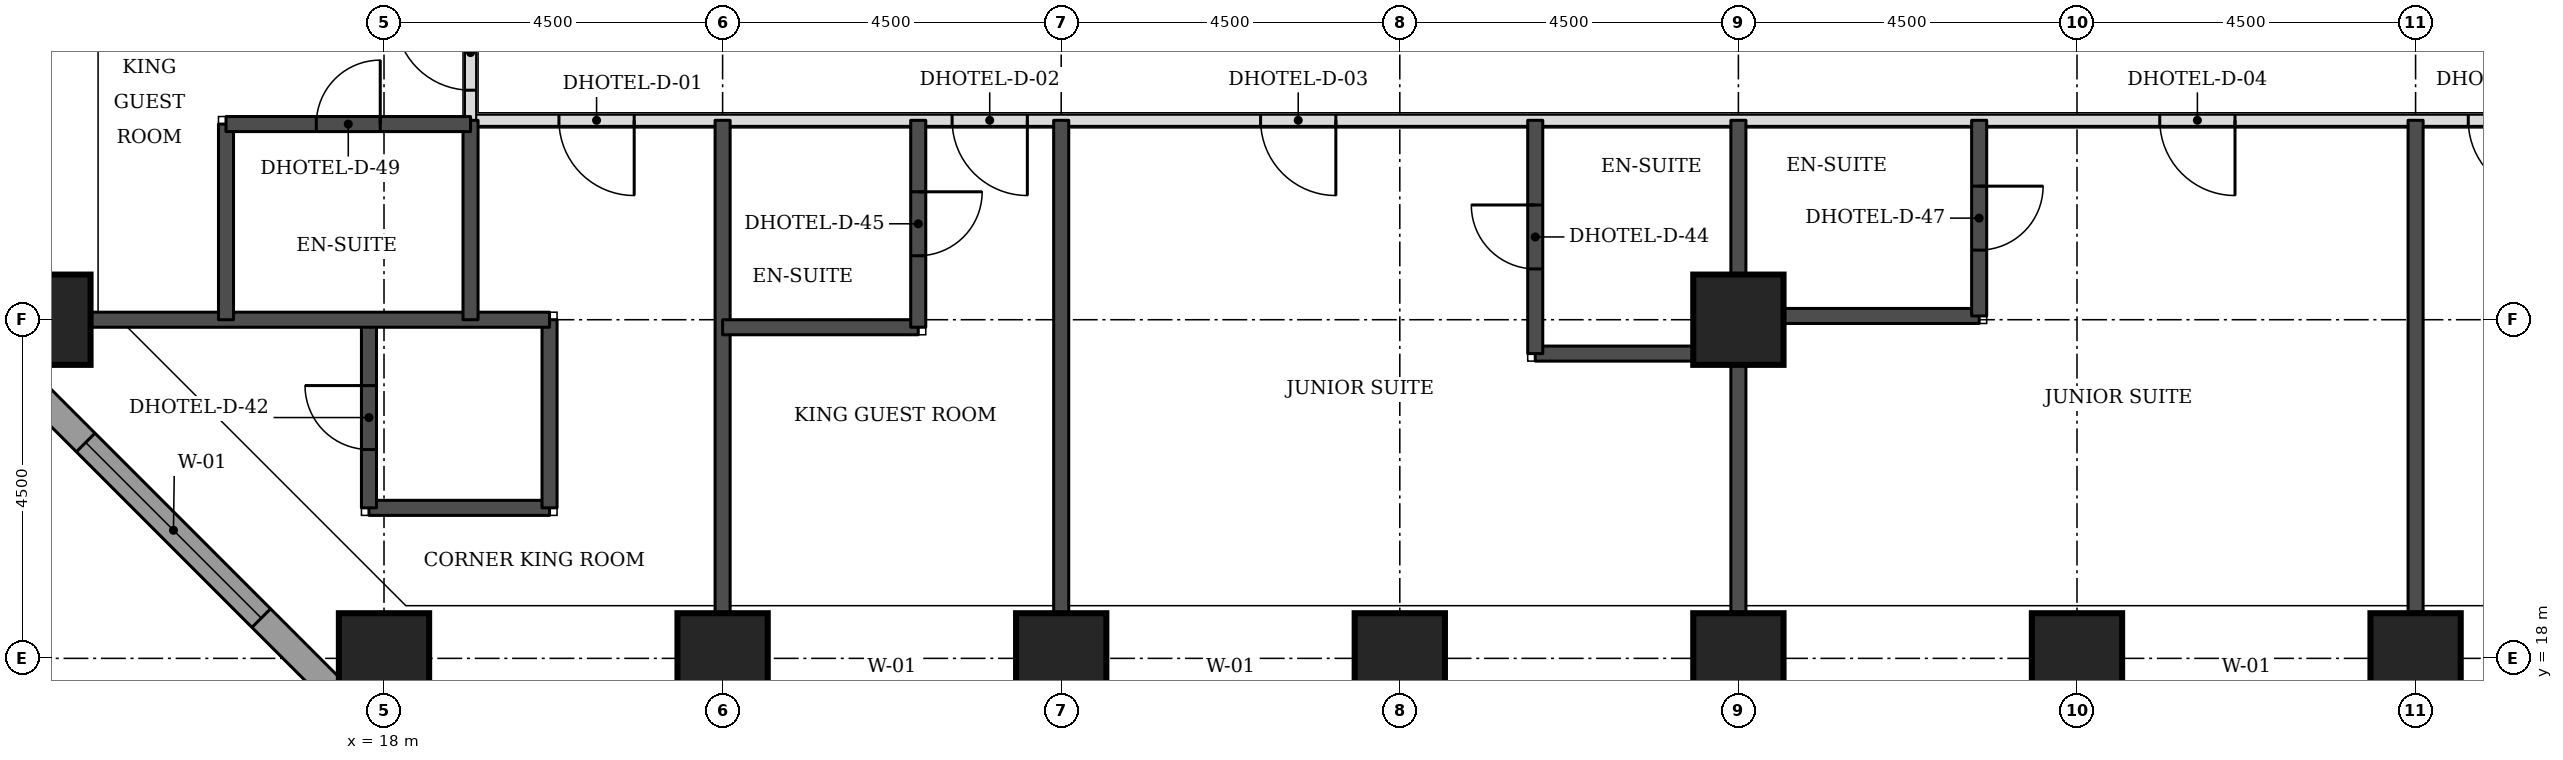
"""IFC4 building model, lengths in metres.
Left out: names, types, materials, properties, quantities, classifications, styles, units other than length and angle.
Written with IfcOpenShell. Run it as: python <this file> out.ifc"""

import sys

from ifc_helpers import new_model, si_unit, direction, frame, frame_2d, origin, origin_2d, place, context, subcontext, project, spatial, rectangle, extrude, element, fill, save


model = new_model("IFC4")
c1 = context("Model", 3, precision=1e-05, world=origin(), true_north=direction((0.0, 1.0)))
c2 = subcontext(c1, "Body", "Model", "MODEL_VIEW")
j1 = project(units=[si_unit("LENGTHUNIT", "METRE"), si_unit("PLANEANGLEUNIT", "RADIAN")], contexts=[c1])
p1 = place(None, origin())
s1 = spatial("IfcSite", under=j1, at=p1, CompositionType="ELEMENT")
p2 = place(p1, origin())
s2 = spatial("IfcBuilding", under=s1, at=p2, CompositionType="ELEMENT")
p3 = place(p2, frame((0.0, 0.0, 59.4)))
s3 = spatial("IfcBuildingStorey", under=s2, at=p3, CompositionType="ELEMENT", Elevation=59.4)
for number, where, z_axis, x_axis in (
    (1, (18.0, 18.0, 0.0), (0.0, 0.0, 1.0), (1.0, 0.0, 0.0)),
    (2, (22.5, 18.0, 0.0), (0.0, 0.0, 1.0), (1.0, 0.0, 0.0)),
    (3, (27.0, 18.0, 0.0), (0.0, 0.0, 1.0), (1.0, 0.0, 0.0)),
    (4, (31.5, 18.0, 0.0), (0.0, 0.0, 1.0), (1.0, 0.0, 0.0)),
    (5, (36.0, 18.0, 0.0), (0.0, 0.0, 1.0), (1.0, 0.0, 0.0)),
    (6, (40.5, 18.0, 0.0), (0.0, 0.0, 1.0), (1.0, 0.0, 0.0)),
    (7, (45.0, 18.0, 0.0), (0.0, 0.0, 1.0), (1.0, 0.0, 0.0)),
    (8, (13.5, 22.5, 0.0), (0.0, 0.0, 1.0), (1.0, 0.0, 0.0)),
    (9, (36.0, 22.5, 0.0), (0.0, 0.0, 1.0), (1.0, 0.0, 0.0)),
):
    element("IfcColumn", number, at=place(p3, frame(where, z_axis=z_axis, x_axis=x_axis)), inside=s3, PredefinedType="COLUMN", context=c2, shape_type="SweptSolid", body=[
        extrude(rectangle(XDim=1.2, YDim=1.2, at=origin_2d()), origin(), (0.0, 0.0, 1.0), 3.3),
    ])
p4 = place(p3, frame((12.674, 22.23, 0.0), z_axis=(0.0, 0.0, 1.0), x_axis=(0.707106781187, -0.707106781187, 0.0)))
e10 = element("IfcWall", 10, at=p4, inside=s3, PredefinedType="STANDARD", context=c2, shape_type="SweptSolid", body=[
    extrude(rectangle(XDim=7.151, YDim=0.35, at=frame_2d((3.576, 0.0))), origin(), (0.0, 0.0, 1.0), 3.055),
])
p5 = place(p4, frame((1.926, 0.0, 0.8)))
e11 = element("IfcOpeningElement", 11, at=p5, cuts=e10, PredefinedType="OPENING", context=c2, shape_type="SweptSolid", body=[
    extrude(rectangle(XDim=3.3, YDim=1.5, at=frame_2d((1.65, 0.75))), frame((0.0, 0.185, 0.0), z_axis=(0.0, -1.0, 0.0), x_axis=(1.0, 0.0, 0.0)), (0.0, 0.0, 1.0), 0.37),
])
p6 = place(p3, frame((19.15, 25.15, 0.0), z_axis=(0.0, 0.0, 1.0), x_axis=(1.0, 0.0, 0.0)))
e12 = element("IfcWall", 12, at=p6, inside=s3, PredefinedType="PARTITIONING", context=c2, shape_type="SweptSolid", body=[
    extrude(rectangle(XDim=32.35, YDim=0.15, at=frame_2d((16.175, 0.0))), origin(), (0.0, 0.0, 1.0), 3.08),
])
p7 = place(p6, frame((6.4, 0.0, 0.0)))
e13 = element("IfcOpeningElement", 13, at=p7, cuts=e12, PredefinedType="OPENING", context=c2, shape_type="SweptSolid", body=[
    extrude(rectangle(XDim=1.0, YDim=2.1, at=frame_2d((0.5, 1.05))), frame((0.0, 0.085, 0.0), z_axis=(0.0, -1.0, 0.0), x_axis=(1.0, 0.0, 0.0)), (0.0, 0.0, 1.0), 0.17),
])
p8 = place(p6, frame((10.5, 0.0, 0.0)))
e14 = element("IfcOpeningElement", 14, at=p8, cuts=e12, PredefinedType="OPENING", context=c2, shape_type="SweptSolid", body=[
    extrude(rectangle(XDim=1.0, YDim=2.1, at=frame_2d((0.5, 1.05))), frame((0.0, 0.085, 0.0), z_axis=(0.0, -1.0, 0.0), x_axis=(1.0, 0.0, 0.0)), (0.0, 0.0, 1.0), 0.17),
])
p9 = place(p6, frame((22.45, 0.0, 0.0)))
e15 = element("IfcOpeningElement", 15, at=p9, cuts=e12, PredefinedType="OPENING", context=c2, shape_type="SweptSolid", body=[
    extrude(rectangle(XDim=1.0, YDim=2.1, at=frame_2d((0.5, 1.05))), frame((0.0, 0.085, 0.0), z_axis=(0.0, -1.0, 0.0), x_axis=(1.0, 0.0, 0.0)), (0.0, 0.0, 1.0), 0.17),
])
p10 = place(p6, frame((26.55, 0.0, 0.0)))
e16 = element("IfcOpeningElement", 16, at=p10, cuts=e12, PredefinedType="OPENING", context=c2, shape_type="SweptSolid", body=[
    extrude(rectangle(XDim=1.0, YDim=2.1, at=frame_2d((0.5, 1.05))), frame((0.0, 0.085, 0.0), z_axis=(0.0, -1.0, 0.0), x_axis=(1.0, 0.0, 0.0)), (0.0, 0.0, 1.0), 0.17),
])
p11 = place(p6, frame((1.175, 0.0, 0.0)))
e17 = element("IfcOpeningElement", 17, at=p11, cuts=e12, PredefinedType="OPENING", context=c2, shape_type="SweptSolid", body=[
    extrude(rectangle(XDim=1.0, YDim=2.1, at=frame_2d((0.5, 1.05))), frame((0.0, 0.085, 0.0), z_axis=(0.0, -1.0, 0.0), x_axis=(1.0, 0.0, 0.0)), (0.0, 0.0, 1.0), 0.17),
])
p12 = place(p6, frame((30.85, 0.0, 0.0)))
e18 = element("IfcOpeningElement", 18, at=p12, cuts=e12, PredefinedType="OPENING", context=c2, shape_type="SweptSolid", body=[
    extrude(rectangle(XDim=1.0, YDim=2.1, at=frame_2d((0.5, 1.05))), frame((0.0, 0.085, 0.0), z_axis=(0.0, -1.0, 0.0), x_axis=(1.0, 0.0, 0.0)), (0.0, 0.0, 1.0), 0.17),
])
p13 = place(p3, frame((19.15, 25.15, 0.0), z_axis=(0.0, 0.0, 1.0), x_axis=(0.0, 1.0, 0.0)))
e19 = element("IfcWall", 19, at=p13, inside=s3, PredefinedType="PARTITIONING", context=c2, shape_type="SweptSolid", body=[
    extrude(rectangle(XDim=24.35, YDim=0.15, at=frame_2d((12.175, 0.0))), origin(), (0.0, 0.0, 1.0), 3.08),
])
p14 = place(p13, frame((0.4, 0.0, 0.0)))
e20 = element("IfcOpeningElement", 20, at=p14, cuts=e19, PredefinedType="OPENING", context=c2, shape_type="SweptSolid", body=[
    extrude(rectangle(XDim=1.0, YDim=2.1, at=frame_2d((0.5, 1.05))), frame((0.0, 0.085, 0.0), z_axis=(0.0, -1.0, 0.0), x_axis=(1.0, 0.0, 0.0)), (0.0, 0.0, 1.0), 0.17),
])
p15 = place(p13, frame((2.55, 0.0, 0.0)))
e21 = element("IfcOpeningElement", 21, at=p15, cuts=e19, PredefinedType="OPENING", context=c2, shape_type="SweptSolid", body=[
    extrude(rectangle(XDim=1.0, YDim=2.1, at=frame_2d((0.5, 1.05))), frame((0.0, 0.085, 0.0), z_axis=(0.0, -1.0, 0.0), x_axis=(1.0, 0.0, 0.0)), (0.0, 0.0, 1.0), 0.17),
])
p16 = place(p13, frame((9.4, 0.0, 0.0)))
e22 = element("IfcOpeningElement", 22, at=p16, cuts=e19, PredefinedType="OPENING", context=c2, shape_type="SweptSolid", body=[
    extrude(rectangle(XDim=1.0, YDim=2.1, at=frame_2d((0.5, 1.05))), frame((0.0, 0.085, 0.0), z_axis=(0.0, -1.0, 0.0), x_axis=(1.0, 0.0, 0.0)), (0.0, 0.0, 1.0), 0.17),
])
p17 = place(p13, frame((11.55, 0.0, 0.0)))
e23 = element("IfcOpeningElement", 23, at=p17, cuts=e19, PredefinedType="OPENING", context=c2, shape_type="SweptSolid", body=[
    extrude(rectangle(XDim=1.0, YDim=2.1, at=frame_2d((0.5, 1.05))), frame((0.0, 0.085, 0.0), z_axis=(0.0, -1.0, 0.0), x_axis=(1.0, 0.0, 0.0)), (0.0, 0.0, 1.0), 0.17),
])
p18 = place(p13, frame((18.4, 0.0, 0.0)))
e24 = element("IfcOpeningElement", 24, at=p18, cuts=e19, PredefinedType="OPENING", context=c2, shape_type="SweptSolid", body=[
    extrude(rectangle(XDim=1.0, YDim=2.1, at=frame_2d((0.5, 1.05))), frame((0.0, 0.085, 0.0), z_axis=(0.0, -1.0, 0.0), x_axis=(1.0, 0.0, 0.0)), (0.0, 0.0, 1.0), 0.17),
])
p19 = place(p13, frame((20.55, 0.0, 0.0)))
e25 = element("IfcOpeningElement", 25, at=p19, cuts=e19, PredefinedType="OPENING", context=c2, shape_type="SweptSolid", body=[
    extrude(rectangle(XDim=1.0, YDim=2.1, at=frame_2d((0.5, 1.05))), frame((0.0, 0.085, 0.0), z_axis=(0.0, -1.0, 0.0), x_axis=(1.0, 0.0, 0.0)), (0.0, 0.0, 1.0), 0.17),
])
for number, where, z_axis, x_axis in (
    (26, (22.5, 18.6, 0.0), (0.0, 0.0, 1.0), (0.0, 1.0, 0.0)),
    (27, (27.0, 18.6, 0.0), (0.0, 0.0, 1.0), (0.0, 1.0, 0.0)),
    (28, (36.0, 18.6, 0.0), (0.0, 0.0, 1.0), (0.0, 1.0, 0.0)),
    (29, (45.0, 18.6, 0.0), (0.0, 0.0, 1.0), (0.0, 1.0, 0.0)),
):
    element("IfcWall", number, at=place(p3, frame(where, z_axis=z_axis, x_axis=x_axis)), inside=s3, PredefinedType="SOLIDWALL", context=c2, shape_type="SweptSolid", body=[
        extrude(rectangle(XDim=6.55, YDim=0.2, at=frame_2d((3.275, 0.0))), origin(), (0.0, 0.0, 1.0), 3.08),
    ])
p20 = place(p3, frame((17.8, 20.0, 0.0), z_axis=(0.0, 0.0, 1.0), x_axis=(1.0, 0.0, 0.0)))
e30 = element("IfcWall", 30, at=p20, inside=s3, PredefinedType="SOLIDWALL", context=c2, shape_type="SweptSolid", body=[
    extrude(rectangle(XDim=2.4, YDim=0.2, at=frame_2d((1.2, 0.0))), origin(), (0.0, 0.0, 1.0), 3.08),
])
p21 = place(p3, frame((17.8, 20.0, 0.0), z_axis=(0.0, 0.0, 1.0), x_axis=(0.0, 1.0, 0.0)))
e31 = element("IfcWall", 31, at=p21, inside=s3, PredefinedType="SOLIDWALL", context=c2, shape_type="SweptSolid", body=[
    extrude(rectangle(XDim=2.5, YDim=0.2, at=frame_2d((1.25, 0.0))), origin(), (0.0, 0.0, 1.0), 3.08),
])
p22 = place(p21, frame((0.775, 0.0, 0.0)))
e32 = element("IfcOpeningElement", 32, at=p22, cuts=e31, PredefinedType="OPENING", context=c2, shape_type="SweptSolid", body=[
    extrude(rectangle(XDim=0.85, YDim=2.1, at=frame_2d((0.425, 1.05))), frame((0.0, 0.11, 0.0), z_axis=(0.0, -1.0, 0.0), x_axis=(1.0, 0.0, 0.0)), (0.0, 0.0, 1.0), 0.22),
])
p23 = place(p3, frame((20.2, 20.0, 0.0), z_axis=(0.0, 0.0, 1.0), x_axis=(0.0, 1.0, 0.0)))
e33 = element("IfcWall", 33, at=p23, inside=s3, PredefinedType="SOLIDWALL", context=c2, shape_type="SweptSolid", body=[
    extrude(rectangle(XDim=2.5, YDim=0.2, at=frame_2d((1.25, 0.0))), origin(), (0.0, 0.0, 1.0), 3.08),
])
p24 = place(p3, frame((33.3, 22.05, 0.0), z_axis=(0.0, 0.0, 1.0), x_axis=(1.0, 0.0, 0.0)))
e34 = element("IfcWall", 34, at=p24, inside=s3, PredefinedType="SOLIDWALL", context=c2, shape_type="SweptSolid", body=[
    extrude(rectangle(XDim=2.7, YDim=0.2, at=frame_2d((1.35, 0.0))), origin(), (0.0, 0.0, 1.0), 3.08),
])
p25 = place(p3, frame((33.3, 22.05, 0.0), z_axis=(0.0, 0.0, 1.0), x_axis=(0.0, 1.0, 0.0)))
e35 = element("IfcWall", 35, at=p25, inside=s3, PredefinedType="SOLIDWALL", context=c2, shape_type="SweptSolid", body=[
    extrude(rectangle(XDim=3.1, YDim=0.2, at=frame_2d((1.55, 0.0))), origin(), (0.0, 0.0, 1.0), 3.08),
])
p26 = place(p25, frame((1.125, 0.0, 0.0)))
e36 = element("IfcOpeningElement", 36, at=p26, cuts=e35, PredefinedType="OPENING", context=c2, shape_type="SweptSolid", body=[
    extrude(rectangle(XDim=0.85, YDim=2.1, at=frame_2d((0.425, 1.05))), frame((0.0, 0.11, 0.0), z_axis=(0.0, -1.0, 0.0), x_axis=(1.0, 0.0, 0.0)), (0.0, 0.0, 1.0), 0.22),
])
p27 = place(p3, frame((22.5, 22.4, 0.0), z_axis=(0.0, 0.0, 1.0), x_axis=(1.0, 0.0, 0.0)))
e37 = element("IfcWall", 37, at=p27, inside=s3, PredefinedType="SOLIDWALL", context=c2, shape_type="SweptSolid", body=[
    extrude(rectangle(XDim=2.6, YDim=0.2, at=frame_2d((1.3, 0.0))), origin(), (0.0, 0.0, 1.0), 3.08),
])
p28 = place(p3, frame((25.1, 22.4, 0.0), z_axis=(0.0, 0.0, 1.0), x_axis=(0.0, 1.0, 0.0)))
e38 = element("IfcWall", 38, at=p28, inside=s3, PredefinedType="SOLIDWALL", context=c2, shape_type="SweptSolid", body=[
    extrude(rectangle(XDim=2.75, YDim=0.2, at=frame_2d((1.375, 0.0))), origin(), (0.0, 0.0, 1.0), 3.08),
])
p29 = place(p28, frame((0.95, 0.0, 0.0)))
e39 = element("IfcOpeningElement", 39, at=p29, cuts=e38, PredefinedType="OPENING", context=c2, shape_type="SweptSolid", body=[
    extrude(rectangle(XDim=0.85, YDim=2.1, at=frame_2d((0.425, 1.05))), frame((0.0, 0.11, 0.0), z_axis=(0.0, -1.0, 0.0), x_axis=(1.0, 0.0, 0.0)), (0.0, 0.0, 1.0), 0.22),
])
p30 = place(p3, frame((14.1, 22.5, 0.0), z_axis=(0.0, 0.0, 1.0), x_axis=(1.0, 0.0, 0.0)))
e40 = element("IfcWall", 40, at=p30, inside=s3, PredefinedType="SOLIDWALL", context=c2, shape_type="SweptSolid", body=[
    extrude(rectangle(XDim=6.1, YDim=0.2, at=frame_2d((3.05, 0.0))), origin(), (0.0, 0.0, 1.0), 3.08),
])
p31 = place(p3, frame((15.9, 22.5, 0.0), z_axis=(0.0, 0.0, 1.0), x_axis=(0.0, 1.0, 0.0)))
e41 = element("IfcWall", 41, at=p31, inside=s3, PredefinedType="SOLIDWALL", context=c2, shape_type="SweptSolid", body=[
    extrude(rectangle(XDim=2.6, YDim=0.2, at=frame_2d((1.3, 0.0))), origin(), (0.0, 0.0, 1.0), 3.08),
])
p32 = place(p3, frame((19.15, 22.5, 0.0), z_axis=(0.0, 0.0, 1.0), x_axis=(0.0, 1.0, 0.0)))
e42 = element("IfcWall", 42, at=p32, inside=s3, PredefinedType="SOLIDWALL", context=c2, shape_type="SweptSolid", body=[
    extrude(rectangle(XDim=2.65, YDim=0.2, at=frame_2d((1.325, 0.0))), origin(), (0.0, 0.0, 1.0), 3.08),
])
p33 = place(p3, frame((36.0, 22.55, 0.0), z_axis=(0.0, 0.0, 1.0), x_axis=(1.0, 0.0, 0.0)))
e43 = element("IfcWall", 43, at=p33, inside=s3, PredefinedType="SOLIDWALL", context=c2, shape_type="SweptSolid", body=[
    extrude(rectangle(XDim=3.2, YDim=0.2, at=frame_2d((1.6, 0.0))), origin(), (0.0, 0.0, 1.0), 3.08),
])
p34 = place(p3, frame((39.2, 22.55, 0.0), z_axis=(0.0, 0.0, 1.0), x_axis=(0.0, 1.0, 0.0)))
e44 = element("IfcWall", 44, at=p34, inside=s3, PredefinedType="SOLIDWALL", context=c2, shape_type="SweptSolid", body=[
    extrude(rectangle(XDim=2.6, YDim=0.2, at=frame_2d((1.3, 0.0))), origin(), (0.0, 0.0, 1.0), 3.08),
])
p35 = place(p34, frame((0.875, 0.0, 0.0)))
e45 = element("IfcOpeningElement", 45, at=p35, cuts=e44, PredefinedType="OPENING", context=c2, shape_type="SweptSolid", body=[
    extrude(rectangle(XDim=0.85, YDim=2.1, at=frame_2d((0.425, 1.05))), frame((0.0, 0.11, 0.0), z_axis=(0.0, -1.0, 0.0), x_axis=(1.0, 0.0, 0.0)), (0.0, 0.0, 1.0), 0.22),
])
p36 = place(p3, frame((15.9, 25.1, 0.0), z_axis=(0.0, 0.0, 1.0), x_axis=(1.0, 0.0, 0.0)))
e46 = element("IfcWall", 46, at=p36, inside=s3, PredefinedType="SOLIDWALL", context=c2, shape_type="SweptSolid", body=[
    extrude(rectangle(XDim=3.25, YDim=0.2, at=frame_2d((1.625, 0.0))), origin(), (0.0, 0.0, 1.0), 3.08),
])
p37 = place(p36, frame((1.2, 0.0, 0.0)))
e47 = element("IfcOpeningElement", 47, at=p37, cuts=e46, PredefinedType="OPENING", context=c2, shape_type="SweptSolid", body=[
    extrude(rectangle(XDim=0.85, YDim=2.1, at=frame_2d((0.425, 1.05))), frame((0.0, 0.11, 0.0), z_axis=(0.0, -1.0, 0.0), x_axis=(1.0, 0.0, 0.0)), (0.0, 0.0, 1.0), 0.22),
])
p38 = place(p5, origin())
e48 = element("IfcWindow", 48, at=p38, inside=s3, PartitioningType="SINGLE_PANEL", PredefinedType="WINDOW", context=c2, shape_type="SweptSolid", body=[
    extrude(rectangle(XDim=3.3, YDim=1.5, at=frame_2d((1.65, 0.75))), frame((0.0, 0.085, 0.0), z_axis=(0.0, -1.0, 0.0), x_axis=(1.0, 0.0, 0.0)), (0.0, 0.0, 1.0), 0.06),
])
fill(e11, e48)
p39 = place(p7, frame((1.0, 0.0, 0.0), z_axis=(0.0, 0.0, 1.0), x_axis=(-1.0, 0.0, 0.0)))
e49 = element("IfcDoor", 49, at=p39, inside=s3, OperationType="SINGLE_SWING_LEFT", PredefinedType="DOOR", context=c2, shape_type="SweptSolid", body=[
    extrude(rectangle(XDim=1.0, YDim=2.1, at=frame_2d((0.5, 1.05))), frame((0.0, 0.025, 0.0), z_axis=(0.0, -1.0, 0.0), x_axis=(1.0, 0.0, 0.0)), (0.0, 0.0, 1.0), 0.05),
])
fill(e13, e49)
p40 = place(p29, frame((0.85, 0.0, 0.0), z_axis=(0.0, 0.0, 1.0), x_axis=(-1.0, 0.0, 0.0)))
e50 = element("IfcDoor", 50, at=p40, inside=s3, OperationType="SINGLE_SWING_LEFT", PredefinedType="DOOR", context=c2, shape_type="SweptSolid", body=[
    extrude(rectangle(XDim=0.85, YDim=2.1, at=frame_2d((0.425, 1.05))), frame((0.0, 0.025, 0.0), z_axis=(0.0, -1.0, 0.0), x_axis=(1.0, 0.0, 0.0)), (0.0, 0.0, 1.0), 0.05),
])
fill(e39, e50)
p41 = place(p8, frame((1.0, 0.0, 0.0), z_axis=(0.0, 0.0, 1.0), x_axis=(-1.0, 0.0, 0.0)))
e51 = element("IfcDoor", 51, at=p41, inside=s3, OperationType="SINGLE_SWING_LEFT", PredefinedType="DOOR", context=c2, shape_type="SweptSolid", body=[
    extrude(rectangle(XDim=1.0, YDim=2.1, at=frame_2d((0.5, 1.05))), frame((0.0, 0.025, 0.0), z_axis=(0.0, -1.0, 0.0), x_axis=(1.0, 0.0, 0.0)), (0.0, 0.0, 1.0), 0.05),
])
fill(e14, e51)
p42 = place(p26, origin())
e52 = element("IfcDoor", 52, at=p42, inside=s3, OperationType="SINGLE_SWING_RIGHT", PredefinedType="DOOR", context=c2, shape_type="SweptSolid", body=[
    extrude(rectangle(XDim=0.85, YDim=2.1, at=frame_2d((0.425, 1.05))), frame((0.0, 0.025, 0.0), z_axis=(0.0, -1.0, 0.0), x_axis=(1.0, 0.0, 0.0)), (0.0, 0.0, 1.0), 0.05),
])
fill(e36, e52)
p43 = place(p9, frame((1.0, 0.0, 0.0), z_axis=(0.0, 0.0, 1.0), x_axis=(-1.0, 0.0, 0.0)))
e53 = element("IfcDoor", 53, at=p43, inside=s3, OperationType="SINGLE_SWING_LEFT", PredefinedType="DOOR", context=c2, shape_type="SweptSolid", body=[
    extrude(rectangle(XDim=1.0, YDim=2.1, at=frame_2d((0.5, 1.05))), frame((0.0, 0.025, 0.0), z_axis=(0.0, -1.0, 0.0), x_axis=(1.0, 0.0, 0.0)), (0.0, 0.0, 1.0), 0.05),
])
fill(e15, e53)
p44 = place(p35, frame((0.85, 0.0, 0.0), z_axis=(0.0, 0.0, 1.0), x_axis=(-1.0, 0.0, 0.0)))
e54 = element("IfcDoor", 54, at=p44, inside=s3, OperationType="SINGLE_SWING_LEFT", PredefinedType="DOOR", context=c2, shape_type="SweptSolid", body=[
    extrude(rectangle(XDim=0.85, YDim=2.1, at=frame_2d((0.425, 1.05))), frame((0.0, 0.025, 0.0), z_axis=(0.0, -1.0, 0.0), x_axis=(1.0, 0.0, 0.0)), (0.0, 0.0, 1.0), 0.05),
])
fill(e45, e54)
p45 = place(p10, frame((1.0, 0.0, 0.0), z_axis=(0.0, 0.0, 1.0), x_axis=(-1.0, 0.0, 0.0)))
e55 = element("IfcDoor", 55, at=p45, inside=s3, OperationType="SINGLE_SWING_LEFT", PredefinedType="DOOR", context=c2, shape_type="SweptSolid", body=[
    extrude(rectangle(XDim=1.0, YDim=2.1, at=frame_2d((0.5, 1.05))), frame((0.0, 0.025, 0.0), z_axis=(0.0, -1.0, 0.0), x_axis=(1.0, 0.0, 0.0)), (0.0, 0.0, 1.0), 0.05),
])
fill(e16, e55)
p46 = place(p14, origin())
e56 = element("IfcDoor", 56, at=p46, inside=s3, OperationType="SINGLE_SWING_RIGHT", PredefinedType="DOOR", context=c2, shape_type="SweptSolid", body=[
    extrude(rectangle(XDim=1.0, YDim=2.1, at=frame_2d((0.5, 1.05))), frame((0.0, 0.025, 0.0), z_axis=(0.0, -1.0, 0.0), x_axis=(1.0, 0.0, 0.0)), (0.0, 0.0, 1.0), 0.05),
])
fill(e20, e56)
p47 = place(p37, origin())
e57 = element("IfcDoor", 57, at=p47, inside=s3, OperationType="SINGLE_SWING_RIGHT", PredefinedType="DOOR", context=c2, shape_type="SweptSolid", body=[
    extrude(rectangle(XDim=0.85, YDim=2.1, at=frame_2d((0.425, 1.05))), frame((0.0, 0.025, 0.0), z_axis=(0.0, -1.0, 0.0), x_axis=(1.0, 0.0, 0.0)), (0.0, 0.0, 1.0), 0.05),
])
fill(e47, e57)
p48 = place(p11, frame((1.0, 0.0, 0.0), z_axis=(0.0, 0.0, 1.0), x_axis=(-1.0, 0.0, 0.0)))
e58 = element("IfcDoor", 58, at=p48, inside=s3, OperationType="SINGLE_SWING_LEFT", PredefinedType="DOOR", context=c2, shape_type="SweptSolid", body=[
    extrude(rectangle(XDim=1.0, YDim=2.1, at=frame_2d((0.5, 1.05))), frame((0.0, 0.025, 0.0), z_axis=(0.0, -1.0, 0.0), x_axis=(1.0, 0.0, 0.0)), (0.0, 0.0, 1.0), 0.05),
])
fill(e17, e58)
p49 = place(p22, origin())
e59 = element("IfcDoor", 59, at=p49, inside=s3, OperationType="SINGLE_SWING_RIGHT", PredefinedType="DOOR", context=c2, shape_type="SweptSolid", body=[
    extrude(rectangle(XDim=0.85, YDim=2.1, at=frame_2d((0.425, 1.05))), frame((0.0, 0.025, 0.0), z_axis=(0.0, -1.0, 0.0), x_axis=(1.0, 0.0, 0.0)), (0.0, 0.0, 1.0), 0.05),
])
fill(e32, e59)
save(model, sys.argv[1])
